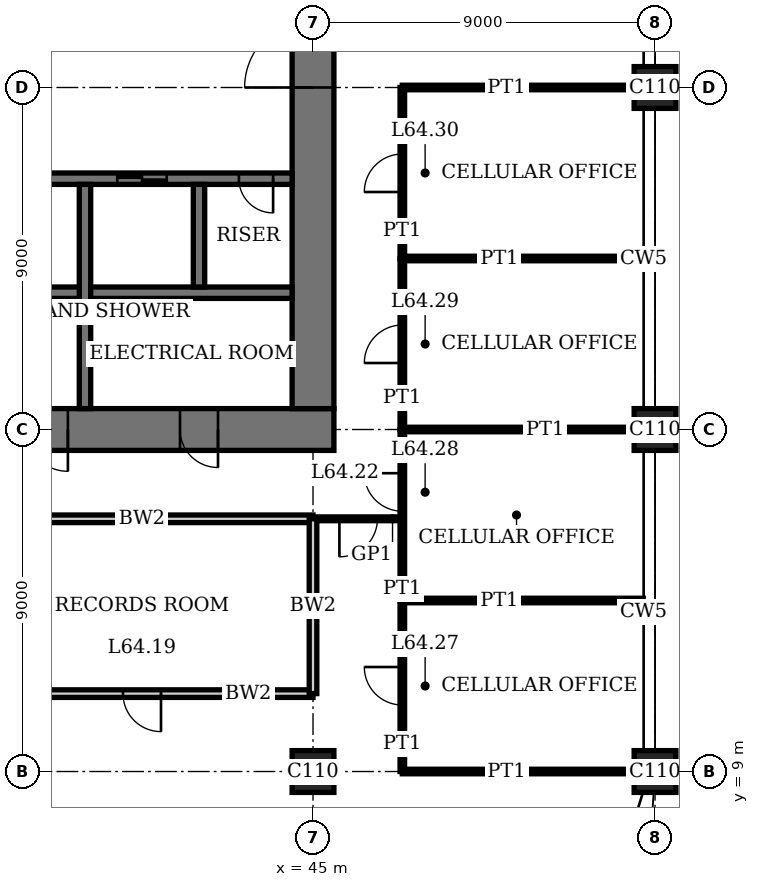
"""IFC4 building model, lengths in metres.
Left out: names, types, materials, properties, quantities, classifications, styles, units other than length and angle.
Written with IfcOpenShell. Run it as: python <this file> out.ifc"""

import sys

from ifc_helpers import new_model, si_unit, direction, frame, frame_2d, origin, origin_2d, place, context, subcontext, project, spatial, rectangle, extrude, element, fill, save


model = new_model("IFC4")
c1 = context("Model", 3, precision=1e-05, world=origin(), true_north=direction((0.0, 1.0)))
c2 = subcontext(c1, "Body", "Model", "MODEL_VIEW")
j1 = project(units=[si_unit("LENGTHUNIT", "METRE"), si_unit("PLANEANGLEUNIT", "RADIAN")], contexts=[c1])
p1 = place(None, origin())
s1 = spatial("IfcSite", under=j1, at=p1, CompositionType="ELEMENT")
p2 = place(p1, origin())
s2 = spatial("IfcBuilding", under=s1, at=p2, CompositionType="ELEMENT")
p3 = place(p2, frame((0.0, 0.0, 263.4)))
s3 = spatial("IfcBuildingStorey", under=s2, at=p3, CompositionType="ELEMENT", Elevation=263.4)
for number, where, z_axis, x_axis in (
    (1, (45.0, 9.0, 0.0), (0.0, 0.0, 1.0), (1.0, 0.0, 0.0)),
    (2, (54.0, 9.0, 0.0), (0.0, 0.0, 1.0), (1.0, 0.0, 0.0)),
    (3, (54.0, 18.0, 0.0), (0.0, 0.0, 1.0), (1.0, 0.0, 0.0)),
    (4, (54.0, 27.0, 0.0), (0.0, 0.0, 1.0), (1.0, 0.0, 0.0)),
):
    element("IfcColumn", number, at=place(p3, frame(where, z_axis=z_axis, x_axis=x_axis)), inside=s3, PredefinedType="COLUMN", context=c2, shape_type="SweptSolid", body=[
        extrude(rectangle(XDim=1.1, YDim=1.1, at=origin_2d()), origin(), (0.0, 0.0, 1.0), 4.0),
    ])
p4 = place(p3, frame((17.45, 18.0, 0.0), z_axis=(0.0, 0.0, 1.0), x_axis=(1.0, 0.0, 0.0)))
e5 = element("IfcWall", 5, at=p4, inside=s3, PredefinedType="SHEAR", context=c2, shape_type="SweptSolid", body=[
    extrude(rectangle(XDim=28.1, YDim=1.1, at=frame_2d((14.05, 0.0))), origin(), (0.0, 0.0, 1.0), 4.0),
])
p5 = place(p4, frame((11.55, 0.0, 0.0)))
e6 = element("IfcOpeningElement", 6, at=p5, cuts=e5, PredefinedType="OPENING", context=c2, shape_type="SweptSolid", body=[
    extrude(rectangle(XDim=1.0, YDim=2.4, at=frame_2d((0.5, 1.2))), frame((0.0, 0.56, 0.0), z_axis=(0.0, -1.0, 0.0), x_axis=(1.0, 0.0, 0.0)), (0.0, 0.0, 1.0), 1.12),
])
p6 = place(p4, frame((16.55, 0.0, 0.0)))
e7 = element("IfcOpeningElement", 7, at=p6, cuts=e5, PredefinedType="OPENING", context=c2, shape_type="SweptSolid", body=[
    extrude(rectangle(XDim=1.0, YDim=2.4, at=frame_2d((0.5, 1.2))), frame((0.0, 0.56, 0.0), z_axis=(0.0, -1.0, 0.0), x_axis=(1.0, 0.0, 0.0)), (0.0, 0.0, 1.0), 1.12),
])
p7 = place(p4, frame((20.0, 0.0, 0.0)))
e8 = element("IfcOpeningElement", 8, at=p7, cuts=e5, PredefinedType="OPENING", context=c2, shape_type="SweptSolid", body=[
    extrude(rectangle(XDim=1.1, YDim=2.4, at=frame_2d((0.55, 1.2))), frame((0.0, 0.56, 0.0), z_axis=(0.0, -1.0, 0.0), x_axis=(1.0, 0.0, 0.0)), (0.0, 0.0, 1.0), 1.12),
])
p8 = place(p4, frame((24.05, 0.0, 0.0)))
e9 = element("IfcOpeningElement", 9, at=p8, cuts=e5, PredefinedType="OPENING", context=c2, shape_type="SweptSolid", body=[
    extrude(rectangle(XDim=1.0, YDim=2.4, at=frame_2d((0.5, 1.2))), frame((0.0, 0.56, 0.0), z_axis=(0.0, -1.0, 0.0), x_axis=(1.0, 0.0, 0.0)), (0.0, 0.0, 1.0), 1.12),
])
p9 = place(p3, frame((45.0, 18.55, 0.0), z_axis=(0.0, 0.0, 1.0), x_axis=(0.0, 1.0, 0.0)))
e10 = element("IfcWall", 10, at=p9, inside=s3, PredefinedType="SHEAR", context=c2, shape_type="SweptSolid", body=[
    extrude(rectangle(XDim=16.9, YDim=1.1, at=frame_2d((8.45, 0.0))), origin(), (0.0, 0.0, 1.0), 4.0),
])
p10 = place(p9, frame((8.45, 0.0, 0.0)))
e11 = element("IfcOpeningElement", 11, at=p10, cuts=e10, PredefinedType="OPENING", context=c2, shape_type="SweptSolid", body=[
    extrude(rectangle(XDim=1.8, YDim=2.4, at=frame_2d((0.9, 1.2))), frame((0.0, 0.56, 0.0), z_axis=(0.0, -1.0, 0.0), x_axis=(1.0, 0.0, 0.0)), (0.0, 0.0, 1.0), 1.12),
])
p11 = place(p3, frame((18.55, 24.6, 0.0), z_axis=(0.0, 0.0, 1.0), x_axis=(1.0, 0.0, 0.0)))
e12 = element("IfcWall", 12, at=p11, inside=s3, PredefinedType="SHEAR", context=c2, shape_type="SweptSolid", body=[
    extrude(rectangle(XDim=25.9, YDim=0.3, at=frame_2d((12.95, 0.0))), origin(), (0.0, 0.0, 1.0), 4.0),
])
p12 = place(p11, frame((4.95, 0.0, 0.0)))
e13 = element("IfcOpeningElement", 13, at=p12, cuts=e12, PredefinedType="OPENING", context=c2, shape_type="SweptSolid", body=[
    extrude(rectangle(XDim=1.0, YDim=2.4, at=frame_2d((0.5, 1.2))), frame((0.0, 0.16, 0.0), z_axis=(0.0, -1.0, 0.0), x_axis=(1.0, 0.0, 0.0)), (0.0, 0.0, 1.0), 0.32),
])
p13 = place(p11, frame((24.5, 0.0, 0.0)))
e14 = element("IfcOpeningElement", 14, at=p13, cuts=e12, PredefinedType="OPENING", context=c2, shape_type="SweptSolid", body=[
    extrude(rectangle(XDim=0.9, YDim=2.1, at=frame_2d((0.45, 1.05))), frame((0.0, 0.16, 0.0), z_axis=(0.0, -1.0, 0.0), x_axis=(1.0, 0.0, 0.0)), (0.0, 0.0, 1.0), 0.32),
])
p14 = place(p11, frame((9.4, 0.0, 0.0)))
e15 = element("IfcOpeningElement", 15, at=p14, cuts=e12, PredefinedType="OPENING", context=c2, shape_type="SweptSolid", body=[
    extrude(rectangle(XDim=1.1, YDim=2.4, at=frame_2d((0.55, 1.2))), frame((0.0, 0.16, 0.0), z_axis=(0.0, -1.0, 0.0), x_axis=(1.0, 0.0, 0.0)), (0.0, 0.0, 1.0), 0.32),
])
p15 = place(p11, frame((12.4, 0.0, 0.0)))
e16 = element("IfcOpeningElement", 16, at=p15, cuts=e12, PredefinedType="OPENING", context=c2, shape_type="SweptSolid", body=[
    extrude(rectangle(XDim=1.1, YDim=2.4, at=frame_2d((0.55, 1.2))), frame((0.0, 0.16, 0.0), z_axis=(0.0, -1.0, 0.0), x_axis=(1.0, 0.0, 0.0)), (0.0, 0.0, 1.0), 0.32),
])
p16 = place(p11, frame((15.4, 0.0, 0.0)))
e17 = element("IfcOpeningElement", 17, at=p16, cuts=e12, PredefinedType="OPENING", context=c2, shape_type="SweptSolid", body=[
    extrude(rectangle(XDim=1.1, YDim=2.4, at=frame_2d((0.55, 1.2))), frame((0.0, 0.16, 0.0), z_axis=(0.0, -1.0, 0.0), x_axis=(1.0, 0.0, 0.0)), (0.0, 0.0, 1.0), 0.32),
])
p17 = place(p11, frame((18.4, 0.0, 0.0)))
e18 = element("IfcOpeningElement", 18, at=p17, cuts=e12, PredefinedType="OPENING", context=c2, shape_type="SweptSolid", body=[
    extrude(rectangle(XDim=1.1, YDim=2.4, at=frame_2d((0.55, 1.2))), frame((0.0, 0.16, 0.0), z_axis=(0.0, -1.0, 0.0), x_axis=(1.0, 0.0, 0.0)), (0.0, 0.0, 1.0), 0.32),
])
p18 = place(p11, frame((21.3, 0.0, 0.0)))
e19 = element("IfcOpeningElement", 19, at=p18, cuts=e12, PredefinedType="OPENING", context=c2, shape_type="SweptSolid", body=[
    extrude(rectangle(XDim=1.3, YDim=2.4, at=frame_2d((0.65, 1.2))), frame((0.0, 0.16, 0.0), z_axis=(0.0, -1.0, 0.0), x_axis=(1.0, 0.0, 0.0)), (0.0, 0.0, 1.0), 0.32),
])
p19 = place(p3, frame((27.15, 21.6, 0.0), z_axis=(0.0, 0.0, 1.0), x_axis=(1.0, 0.0, 0.0)))
e20 = element("IfcWall", 20, at=p19, inside=s3, PredefinedType="SHEAR", context=c2, shape_type="SweptSolid", body=[
    extrude(rectangle(XDim=17.3, YDim=0.3, at=frame_2d((8.65, 0.0))), origin(), (0.0, 0.0, 1.0), 4.0),
])
p20 = place(p3, frame((39.0, 18.55, 0.0), z_axis=(0.0, 0.0, 1.0), x_axis=(0.0, 1.0, 0.0)))
e21 = element("IfcWall", 21, at=p20, inside=s3, PredefinedType="SHEAR", context=c2, shape_type="SweptSolid", body=[
    extrude(rectangle(XDim=5.9, YDim=0.3, at=frame_2d((2.95, 0.0))), origin(), (0.0, 0.0, 1.0), 4.0),
])
p21 = place(p3, frame((42.0, 21.75, 0.0), z_axis=(0.0, 0.0, 1.0), x_axis=(0.0, 1.0, 0.0)))
e22 = element("IfcWall", 22, at=p21, inside=s3, PredefinedType="SHEAR", context=c2, shape_type="SweptSolid", body=[
    extrude(rectangle(XDim=2.7, YDim=0.3, at=frame_2d((1.35, 0.0))), origin(), (0.0, 0.0, 1.0), 4.0),
])
p22 = place(p3, frame((47.35, 9.0, 0.0), z_axis=(0.0, 0.0, 1.0), x_axis=(1.0, 0.0, 0.0)))
e23 = element("IfcWall", 23, at=p22, inside=s3, PredefinedType="PARTITIONING", context=c2, shape_type="SweptSolid", body=[
    extrude(rectangle(XDim=6.1, YDim=0.12, at=frame_2d((3.05, 0.0))), origin(), (0.0, 0.0, 1.0), 3.05),
])
p23 = place(p3, frame((36.0, 11.05, 0.0), z_axis=(0.0, 0.0, 1.0), x_axis=(1.0, 0.0, 0.0)))
e24 = element("IfcWall", 24, at=p23, inside=s3, PredefinedType="SOLIDWALL", context=c2, shape_type="SweptSolid", body=[
    extrude(rectangle(XDim=9.0, YDim=0.2, at=frame_2d((4.5, 0.0))), origin(), (0.0, 0.0, 1.0), 3.75),
])
p24 = place(p23, frame((4.0, 0.0, 0.0)))
e25 = element("IfcOpeningElement", 25, at=p24, cuts=e24, PredefinedType="OPENING", context=c2, shape_type="SweptSolid", body=[
    extrude(rectangle(XDim=1.0, YDim=2.4, at=frame_2d((0.5, 1.2))), frame((0.0, 0.11, 0.0), z_axis=(0.0, -1.0, 0.0), x_axis=(1.0, 0.0, 0.0)), (0.0, 0.0, 1.0), 0.22),
])
p25 = place(p3, frame((47.35, 13.5, 0.0), z_axis=(0.0, 0.0, 1.0), x_axis=(1.0, 0.0, 0.0)))
e26 = element("IfcWall", 26, at=p25, inside=s3, PredefinedType="PARTITIONING", context=c2, shape_type="SweptSolid", body=[
    extrude(rectangle(XDim=6.34, YDim=0.12, at=frame_2d((3.17, 0.0))), origin(), (0.0, 0.0, 1.0), 3.1),
])
p26 = place(p3, frame((36.0, 15.65, 0.0), z_axis=(0.0, 0.0, 1.0), x_axis=(1.0, 0.0, 0.0)))
e27 = element("IfcWall", 27, at=p26, inside=s3, PredefinedType="SOLIDWALL", context=c2, shape_type="SweptSolid", body=[
    extrude(rectangle(XDim=9.0, YDim=0.2, at=frame_2d((4.5, 0.0))), origin(), (0.0, 0.0, 1.0), 3.75),
])
p27 = place(p3, frame((45.05, 15.65, 0.0), z_axis=(0.0, 0.0, 1.0), x_axis=(1.0, 0.0, 0.0)))
e28 = element("IfcWall", 28, at=p27, inside=s3, PredefinedType="PARTITIONING", context=c2, shape_type="SweptSolid", body=[
    extrude(rectangle(XDim=2.29, YDim=0.1, at=frame_2d((1.145, 0.0))), origin(), (0.0, 0.0, 1.0), 3.75),
])
p28 = place(p27, frame((0.645, 0.0, 0.0)))
e29 = element("IfcOpeningElement", 29, at=p28, cuts=e28, PredefinedType="OPENING", context=c2, shape_type="SweptSolid", body=[
    extrude(rectangle(XDim=1.0, YDim=2.4, at=frame_2d((0.5, 1.2))), frame((0.0, 0.06, 0.0), z_axis=(0.0, -1.0, 0.0), x_axis=(1.0, 0.0, 0.0)), (0.0, 0.0, 1.0), 0.12),
])
p29 = place(p3, frame((47.35, 18.0, 0.0), z_axis=(0.0, 0.0, 1.0), x_axis=(1.0, 0.0, 0.0)))
e30 = element("IfcWall", 30, at=p29, inside=s3, PredefinedType="PARTITIONING", context=c2, shape_type="SweptSolid", body=[
    extrude(rectangle(XDim=6.1, YDim=0.12, at=frame_2d((3.05, 0.0))), origin(), (0.0, 0.0, 1.0), 3.05),
])
p30 = place(p3, frame((47.35, 22.5, 0.0), z_axis=(0.0, 0.0, 1.0), x_axis=(1.0, 0.0, 0.0)))
e31 = element("IfcWall", 31, at=p30, inside=s3, PredefinedType="PARTITIONING", context=c2, shape_type="SweptSolid", body=[
    extrude(rectangle(XDim=6.34, YDim=0.12, at=frame_2d((3.17, 0.0))), origin(), (0.0, 0.0, 1.0), 3.1),
])
p31 = place(p3, frame((47.35, 27.0, 0.0), z_axis=(0.0, 0.0, 1.0), x_axis=(1.0, 0.0, 0.0)))
e32 = element("IfcWall", 32, at=p31, inside=s3, PredefinedType="PARTITIONING", context=c2, shape_type="SweptSolid", body=[
    extrude(rectangle(XDim=6.1, YDim=0.12, at=frame_2d((3.05, 0.0))), origin(), (0.0, 0.0, 1.0), 3.05),
])
p32 = place(p3, frame((45.0, 11.05, 0.0), z_axis=(0.0, 0.0, 1.0), x_axis=(0.0, 1.0, 0.0)))
e33 = element("IfcWall", 33, at=p32, inside=s3, PredefinedType="SOLIDWALL", context=c2, shape_type="SweptSolid", body=[
    extrude(rectangle(XDim=4.6, YDim=0.2, at=frame_2d((2.3, 0.0))), origin(), (0.0, 0.0, 1.0), 3.05),
])
p33 = place(p3, frame((47.35, 9.0, 0.0), z_axis=(0.0, 0.0, 1.0), x_axis=(0.0, 1.0, 0.0)))
e34 = element("IfcWall", 34, at=p33, inside=s3, PredefinedType="PARTITIONING", context=c2, shape_type="SweptSolid", body=[
    extrude(rectangle(XDim=4.5, YDim=0.12, at=frame_2d((2.25, 0.0))), origin(), (0.0, 0.0, 1.0), 3.75),
])
p34 = place(p33, frame((1.75, 0.0, 0.0)))
e35 = element("IfcOpeningElement", 35, at=p34, cuts=e34, PredefinedType="OPENING", context=c2, shape_type="SweptSolid", body=[
    extrude(rectangle(XDim=1.0, YDim=2.4, at=frame_2d((0.5, 1.2))), frame((0.0, 0.07, 0.0), z_axis=(0.0, -1.0, 0.0), x_axis=(1.0, 0.0, 0.0)), (0.0, 0.0, 1.0), 0.14),
])
p35 = place(p3, frame((47.35, 13.5, 0.0), z_axis=(0.0, 0.0, 1.0), x_axis=(0.0, 1.0, 0.0)))
e36 = element("IfcWall", 36, at=p35, inside=s3, PredefinedType="PARTITIONING", context=c2, shape_type="SweptSolid", body=[
    extrude(rectangle(XDim=4.5, YDim=0.12, at=frame_2d((2.25, 0.0))), origin(), (0.0, 0.0, 1.0), 3.75),
])
p36 = place(p35, frame((2.35, 0.0, 0.0)))
e37 = element("IfcOpeningElement", 37, at=p36, cuts=e36, PredefinedType="OPENING", context=c2, shape_type="SweptSolid", body=[
    extrude(rectangle(XDim=1.0, YDim=2.4, at=frame_2d((0.5, 1.2))), frame((0.0, 0.07, 0.0), z_axis=(0.0, -1.0, 0.0), x_axis=(1.0, 0.0, 0.0)), (0.0, 0.0, 1.0), 0.14),
])
p37 = place(p3, frame((47.35, 18.0, 0.0), z_axis=(0.0, 0.0, 1.0), x_axis=(0.0, 1.0, 0.0)))
e38 = element("IfcWall", 38, at=p37, inside=s3, PredefinedType="PARTITIONING", context=c2, shape_type="SweptSolid", body=[
    extrude(rectangle(XDim=4.5, YDim=0.12, at=frame_2d((2.25, 0.0))), origin(), (0.0, 0.0, 1.0), 3.75),
])
p38 = place(p37, frame((1.75, 0.0, 0.0)))
e39 = element("IfcOpeningElement", 39, at=p38, cuts=e38, PredefinedType="OPENING", context=c2, shape_type="SweptSolid", body=[
    extrude(rectangle(XDim=1.0, YDim=2.4, at=frame_2d((0.5, 1.2))), frame((0.0, 0.07, 0.0), z_axis=(0.0, -1.0, 0.0), x_axis=(1.0, 0.0, 0.0)), (0.0, 0.0, 1.0), 0.14),
])
p39 = place(p3, frame((47.35, 22.5, 0.0), z_axis=(0.0, 0.0, 1.0), x_axis=(0.0, 1.0, 0.0)))
e40 = element("IfcWall", 40, at=p39, inside=s3, PredefinedType="PARTITIONING", context=c2, shape_type="SweptSolid", body=[
    extrude(rectangle(XDim=4.5, YDim=0.12, at=frame_2d((2.25, 0.0))), origin(), (0.0, 0.0, 1.0), 3.75),
])
p40 = place(p39, frame((1.75, 0.0, 0.0)))
e41 = element("IfcOpeningElement", 41, at=p40, cuts=e40, PredefinedType="OPENING", context=c2, shape_type="SweptSolid", body=[
    extrude(rectangle(XDim=1.0, YDim=2.4, at=frame_2d((0.5, 1.2))), frame((0.0, 0.07, 0.0), z_axis=(0.0, -1.0, 0.0), x_axis=(1.0, 0.0, 0.0)), (0.0, 0.0, 1.0), 0.14),
])
p41 = place(p10, origin())
e42 = element("IfcDoor", 42, at=p41, inside=s3, OperationType="DOUBLE_DOOR_DOUBLE_SWING", PredefinedType="DOOR", context=c2, shape_type="SweptSolid", body=[
    extrude(rectangle(XDim=1.8, YDim=2.4, at=frame_2d((0.9, 1.2))), frame((0.0, 0.03, 0.0), z_axis=(0.0, -1.0, 0.0), x_axis=(1.0, 0.0, 0.0)), (0.0, 0.0, 1.0), 0.06),
    extrude(rectangle(XDim=0.04, YDim=2.4, at=frame_2d((0.02, 1.2))), frame((0.0, 0.55, 0.0), z_axis=(0.0, -1.0, 0.0), x_axis=(1.0, 0.0, 0.0)), (0.0, 0.0, 1.0), 1.1),
    extrude(rectangle(XDim=0.04, YDim=2.4, at=frame_2d((1.78, 1.2))), frame((0.0, 0.55, 0.0), z_axis=(0.0, -1.0, 0.0), x_axis=(1.0, 0.0, 0.0)), (0.0, 0.0, 1.0), 1.1),
    extrude(rectangle(XDim=1.8, YDim=0.04, at=frame_2d((0.9, 2.38))), frame((0.0, 0.55, 0.0), z_axis=(0.0, -1.0, 0.0), x_axis=(1.0, 0.0, 0.0)), (0.0, 0.0, 1.0), 1.1),
])
fill(e11, e42)
p42 = place(p7, origin())
e43 = element("IfcDoor", 43, at=p42, inside=s3, OperationType="SINGLE_SWING_RIGHT", PredefinedType="DOOR", context=c2, shape_type="SweptSolid", body=[
    extrude(rectangle(XDim=1.1, YDim=2.4, at=frame_2d((0.55, 1.2))), frame((0.0, 0.025, 0.0), z_axis=(0.0, -1.0, 0.0), x_axis=(1.0, 0.0, 0.0)), (0.0, 0.0, 1.0), 0.05),
    extrude(rectangle(XDim=0.04, YDim=2.4, at=frame_2d((0.02, 1.2))), frame((0.0, 0.44, 0.0), z_axis=(0.0, -1.0, 0.0), x_axis=(1.0, 0.0, 0.0)), (0.0, 0.0, 1.0), 0.88),
    extrude(rectangle(XDim=0.04, YDim=2.4, at=frame_2d((1.08, 1.2))), frame((0.0, 0.44, 0.0), z_axis=(0.0, -1.0, 0.0), x_axis=(1.0, 0.0, 0.0)), (0.0, 0.0, 1.0), 0.88),
    extrude(rectangle(XDim=1.1, YDim=0.04, at=frame_2d((0.55, 2.38))), frame((0.0, 0.44, 0.0), z_axis=(0.0, -1.0, 0.0), x_axis=(1.0, 0.0, 0.0)), (0.0, 0.0, 1.0), 0.88),
])
fill(e8, e43)
p43 = place(p8, origin())
e44 = element("IfcDoor", 44, at=p43, inside=s3, OperationType="SINGLE_SWING_RIGHT", PredefinedType="DOOR", context=c2, shape_type="SweptSolid", body=[
    extrude(rectangle(XDim=1.0, YDim=2.4, at=frame_2d((0.5, 1.2))), frame((0.0, 0.025, 0.0), z_axis=(0.0, -1.0, 0.0), x_axis=(1.0, 0.0, 0.0)), (0.0, 0.0, 1.0), 0.05),
    extrude(rectangle(XDim=0.04, YDim=2.4, at=frame_2d((0.02, 1.2))), frame((0.0, 0.4, 0.0), z_axis=(0.0, -1.0, 0.0), x_axis=(1.0, 0.0, 0.0)), (0.0, 0.0, 1.0), 0.8),
    extrude(rectangle(XDim=0.04, YDim=2.4, at=frame_2d((0.98, 1.2))), frame((0.0, 0.4, 0.0), z_axis=(0.0, -1.0, 0.0), x_axis=(1.0, 0.0, 0.0)), (0.0, 0.0, 1.0), 0.8),
    extrude(rectangle(XDim=1.0, YDim=0.04, at=frame_2d((0.5, 2.38))), frame((0.0, 0.4, 0.0), z_axis=(0.0, -1.0, 0.0), x_axis=(1.0, 0.0, 0.0)), (0.0, 0.0, 1.0), 0.8),
])
fill(e9, e44)
p44 = place(p13, origin())
e45 = element("IfcDoor", 45, at=p44, inside=s3, OperationType="SINGLE_SWING_RIGHT", PredefinedType="DOOR", context=c2, shape_type="SweptSolid", body=[
    extrude(rectangle(XDim=0.9, YDim=2.1, at=frame_2d((0.45, 1.05))), frame((0.0, 0.03, 0.0), z_axis=(0.0, -1.0, 0.0), x_axis=(1.0, 0.0, 0.0)), (0.0, 0.0, 1.0), 0.06),
])
fill(e14, e45)
p45 = place(p24, origin())
e46 = element("IfcDoor", 46, at=p45, inside=s3, OperationType="SINGLE_SWING_RIGHT", PredefinedType="DOOR", context=c2, shape_type="SweptSolid", body=[
    extrude(rectangle(XDim=1.0, YDim=2.4, at=frame_2d((0.5, 1.2))), frame((0.0, 0.035, 0.0), z_axis=(0.0, -1.0, 0.0), x_axis=(1.0, 0.0, 0.0)), (0.0, 0.0, 1.0), 0.07),
])
fill(e25, e46)
p46 = place(p28, origin())
e47 = element("IfcDoor", 47, at=p46, inside=s3, OperationType="SINGLE_SWING_LEFT", PredefinedType="DOOR", context=c2, shape_type="SweptSolid", body=[
    extrude(rectangle(XDim=1.0, YDim=2.4, at=frame_2d((0.5, 1.2))), frame((0.0, 0.02, 0.0), z_axis=(0.0, -1.0, 0.0), x_axis=(1.0, 0.0, 0.0)), (0.0, 0.0, 1.0), 0.04),
])
fill(e29, e47)
p47 = place(p34, origin())
e48 = element("IfcDoor", 48, at=p47, inside=s3, OperationType="SINGLE_SWING_LEFT", PredefinedType="DOOR", context=c2, shape_type="SweptSolid", body=[
    extrude(rectangle(XDim=1.0, YDim=2.4, at=frame_2d((0.5, 1.2))), frame((0.0, 0.025, 0.0), z_axis=(0.0, -1.0, 0.0), x_axis=(1.0, 0.0, 0.0)), (0.0, 0.0, 1.0), 0.05),
])
fill(e35, e48)
p48 = place(p36, origin())
e49 = element("IfcDoor", 49, at=p48, inside=s3, OperationType="SINGLE_SWING_LEFT", PredefinedType="DOOR", context=c2, shape_type="SweptSolid", body=[
    extrude(rectangle(XDim=1.0, YDim=2.4, at=frame_2d((0.5, 1.2))), frame((0.0, 0.025, 0.0), z_axis=(0.0, -1.0, 0.0), x_axis=(1.0, 0.0, 0.0)), (0.0, 0.0, 1.0), 0.05),
])
fill(e37, e49)
p49 = place(p38, origin())
e50 = element("IfcDoor", 50, at=p49, inside=s3, OperationType="SINGLE_SWING_RIGHT", PredefinedType="DOOR", context=c2, shape_type="SweptSolid", body=[
    extrude(rectangle(XDim=1.0, YDim=2.4, at=frame_2d((0.5, 1.2))), frame((0.0, 0.025, 0.0), z_axis=(0.0, -1.0, 0.0), x_axis=(1.0, 0.0, 0.0)), (0.0, 0.0, 1.0), 0.05),
])
fill(e39, e50)
p50 = place(p40, origin())
e51 = element("IfcDoor", 51, at=p50, inside=s3, OperationType="SINGLE_SWING_RIGHT", PredefinedType="DOOR", context=c2, shape_type="SweptSolid", body=[
    extrude(rectangle(XDim=1.0, YDim=2.4, at=frame_2d((0.5, 1.2))), frame((0.0, 0.025, 0.0), z_axis=(0.0, -1.0, 0.0), x_axis=(1.0, 0.0, 0.0)), (0.0, 0.0, 1.0), 0.05),
])
fill(e41, e51)
p51 = place(p18, origin())
e52 = element("IfcDoor", 52, at=p51, inside=s3, OperationType="DOUBLE_DOOR_SLIDING", PredefinedType="DOOR", context=c2, shape_type="SweptSolid", body=[
    extrude(rectangle(XDim=1.3, YDim=2.4, at=frame_2d((0.65, 1.2))), frame((0.0, 0.02, 0.0), z_axis=(0.0, -1.0, 0.0), x_axis=(1.0, 0.0, 0.0)), (0.0, 0.0, 1.0), 0.04),
])
fill(e19, e52)
save(model, sys.argv[1])
